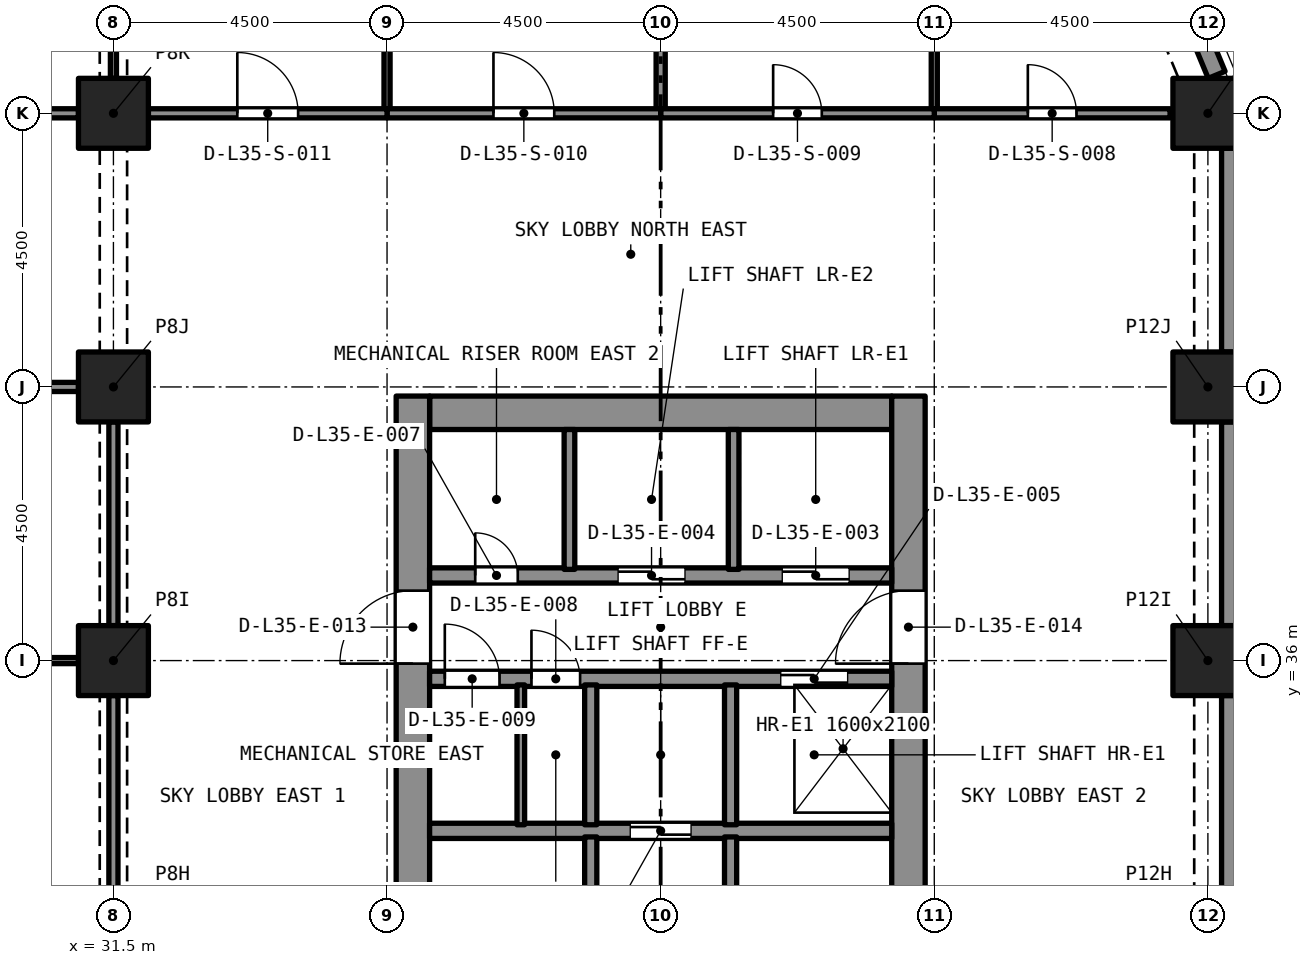
"""IFC4 building model, lengths in metres.
Left out: names, types, materials, properties, quantities, classifications, styles, units other than length and angle.
Written with IfcOpenShell. Run it as: python <this file> out.ifc"""

import sys

from ifc_helpers import new_model, si_unit, direction, frame, frame_2d, origin, origin_2d, place, context, subcontext, project, spatial, rectangle, extrude, element, fill, save


model = new_model("IFC4")
c1 = context("Model", 3, precision=1e-05, world=origin(), true_north=direction((0.0, 1.0)))
c2 = subcontext(c1, "Body", "Model", "MODEL_VIEW")
j1 = project(units=[si_unit("LENGTHUNIT", "METRE"), si_unit("PLANEANGLEUNIT", "RADIAN")], contexts=[c1])
p1 = place(None, origin())
s1 = spatial("IfcSite", under=j1, at=p1, CompositionType="ELEMENT")
p2 = place(p1, origin())
s2 = spatial("IfcBuilding", under=s1, at=p2, CompositionType="ELEMENT")
p3 = place(p2, frame((0.0, 0.0, 124.8)))
s3 = spatial("IfcBuildingStorey", under=s2, at=p3, CompositionType="ELEMENT", Elevation=124.8)
for number, where, z_axis, x_axis in (
    (1, (31.5, 36.0, 0.0), (0.0, 0.0, 1.0), (1.0, 0.0, 0.0)),
    (2, (49.5, 36.0, 0.0), (0.0, 0.0, 1.0), (1.0, 0.0, 0.0)),
    (3, (31.5, 40.5, 0.0), (0.0, 0.0, 1.0), (1.0, 0.0, 0.0)),
    (4, (49.5, 40.5, 0.0), (0.0, 0.0, 1.0), (1.0, 0.0, 0.0)),
    (5, (31.5, 45.0, 0.0), (0.0, 0.0, 1.0), (1.0, 0.0, 0.0)),
    (6, (49.5, 45.0, 0.0), (0.0, 0.0, 1.0), (1.0, 0.0, 0.0)),
):
    element("IfcColumn", number, at=place(p3, frame(where, z_axis=z_axis, x_axis=x_axis)), inside=s3, PredefinedType="COLUMN", context=c2, shape_type="SweptSolid", body=[
        extrude(rectangle(XDim=1.15, YDim=1.15, at=origin_2d()), origin(), (0.0, 0.0, 1.0), 5.4),
    ])
p4 = place(p3, frame((36.7, 40.075, 0.0), z_axis=(0.0, 0.0, 1.0), x_axis=(1.0, 0.0, 0.0)))
e7 = element("IfcWall", 7, at=p4, inside=s3, PredefinedType="SOLIDWALL", context=c2, shape_type="SweptSolid", body=[
    extrude(rectangle(XDim=7.6, YDim=0.55, at=frame_2d((3.8, 0.0))), origin(), (0.0, 0.0, 1.0), 5.4),
])
p5 = place(p3, frame((36.425, 27.15, 0.0), z_axis=(0.0, 0.0, 1.0), x_axis=(0.0, 1.0, 0.0)))
e8 = element("IfcWall", 8, at=p5, inside=s3, PredefinedType="SOLIDWALL", context=c2, shape_type="SweptSolid", body=[
    extrude(rectangle(XDim=13.2, YDim=0.55, at=frame_2d((6.6, 0.0))), origin(), (0.0, 0.0, 1.0), 5.4),
])
p6 = place(p5, frame((8.8, 0.0, 0.0)))
e9 = element("IfcOpeningElement", 9, at=p6, cuts=e8, PredefinedType="OPENING", context=c2, shape_type="SweptSolid", body=[
    extrude(rectangle(XDim=1.2, YDim=2.1, at=frame_2d((0.6, 1.05))), frame((0.0, 0.285, 0.0), z_axis=(0.0, -1.0, 0.0), x_axis=(1.0, 0.0, 0.0)), (0.0, 0.0, 1.0), 0.57),
])
p7 = place(p3, frame((44.575, 27.15, 0.0), z_axis=(0.0, 0.0, 1.0), x_axis=(0.0, 1.0, 0.0)))
e10 = element("IfcWall", 10, at=p7, inside=s3, PredefinedType="SOLIDWALL", context=c2, shape_type="SweptSolid", body=[
    extrude(rectangle(XDim=13.2, YDim=0.55, at=frame_2d((6.6, 0.0))), origin(), (0.0, 0.0, 1.0), 5.4),
])
p8 = place(p7, frame((8.8, 0.0, 0.0)))
e11 = element("IfcOpeningElement", 11, at=p8, cuts=e10, PredefinedType="OPENING", context=c2, shape_type="SweptSolid", body=[
    extrude(rectangle(XDim=1.2, YDim=2.1, at=frame_2d((0.6, 1.05))), frame((0.0, 0.285, 0.0), z_axis=(0.0, -1.0, 0.0), x_axis=(1.0, 0.0, 0.0)), (0.0, 0.0, 1.0), 0.57),
])
for number, where, z_axis, x_axis in (
    (12, (49.875, 35.425, 0.0), (0.0, 0.0, 1.0), (0.0, -1.0, 0.0)),
    (13, (49.875, 39.925, 0.0), (0.0, 0.0, 1.0), (0.0, -1.0, 0.0)),
    (14, (49.875, 44.425, 0.0), (0.0, 0.0, 1.0), (0.0, -1.0, 0.0)),
):
    element("IfcWall", number, at=place(p3, frame(where, z_axis=z_axis, x_axis=x_axis)), inside=s3, PredefinedType="SOLIDWALL", context=c2, shape_type="SweptSolid", body=[
        extrude(rectangle(XDim=3.35, YDim=0.3, at=frame_2d((1.675, 0.0))), origin(), (0.0, 0.0, 1.0), 5.4),
    ])
p9 = place(p3, frame((48.816, 47.631, 0.0), z_axis=(0.0, 0.0, 1.0), x_axis=(0.382723818695, -0.923862802911, 0.0)))
e15 = element("IfcWall", 15, at=p9, inside=s3, PredefinedType="SOLIDWALL", context=c2, shape_type="SweptSolid", body=[
    extrude(rectangle(XDim=2.164, YDim=0.3, at=frame_2d((1.082, 0.0))), origin(), (0.0, 0.0, 1.0), 5.4),
])
p10 = place(p3, frame((36.7, 33.2, 0.0), z_axis=(0.0, 0.0, 1.0), x_axis=(1.0, 0.0, 0.0)))
e16 = element("IfcWall", 16, at=p10, inside=s3, PredefinedType="SOLIDWALL", context=c2, shape_type="SweptSolid", body=[
    extrude(rectangle(XDim=7.6, YDim=0.25, at=frame_2d((3.8, 0.0))), origin(), (0.0, 0.0, 1.0), 5.1),
])
p11 = place(p10, frame((3.3, 0.0, 0.0)))
e17 = element("IfcOpeningElement", 17, at=p11, cuts=e16, PredefinedType="OPENING", context=c2, shape_type="SweptSolid", body=[
    extrude(rectangle(XDim=1.0, YDim=2.1, at=frame_2d((0.5, 1.05))), frame((0.0, 0.135, 0.0), z_axis=(0.0, -1.0, 0.0), x_axis=(1.0, 0.0, 0.0)), (0.0, 0.0, 1.0), 0.27),
])
p12 = place(p3, frame((36.7, 35.7, 0.0), z_axis=(0.0, 0.0, 1.0), x_axis=(1.0, 0.0, 0.0)))
e18 = element("IfcWall", 18, at=p12, inside=s3, PredefinedType="SOLIDWALL", context=c2, shape_type="SweptSolid", body=[
    extrude(rectangle(XDim=7.6, YDim=0.25, at=frame_2d((3.8, 0.0))), origin(), (0.0, 0.0, 1.0), 5.1),
])
p13 = place(p12, frame((5.775, 0.0, 0.0)))
e19 = element("IfcOpeningElement", 19, at=p13, cuts=e18, PredefinedType="OPENING", context=c2, shape_type="SweptSolid", body=[
    extrude(rectangle(XDim=1.1, YDim=2.4, at=frame_2d((0.55, 1.2))), frame((0.0, 0.135, 0.0), z_axis=(0.0, -1.0, 0.0), x_axis=(1.0, 0.0, 0.0)), (0.0, 0.0, 1.0), 0.27),
])
p14 = place(p12, frame((1.675, 0.0, 0.0)))
e20 = element("IfcOpeningElement", 20, at=p14, cuts=e18, PredefinedType="OPENING", context=c2, shape_type="SweptSolid", body=[
    extrude(rectangle(XDim=0.8, YDim=2.1, at=frame_2d((0.4, 1.05))), frame((0.0, 0.135, 0.0), z_axis=(0.0, -1.0, 0.0), x_axis=(1.0, 0.0, 0.0)), (0.0, 0.0, 1.0), 0.27),
])
p15 = place(p12, frame((0.25, 0.0, 0.0)))
e21 = element("IfcOpeningElement", 21, at=p15, cuts=e18, PredefinedType="OPENING", context=c2, shape_type="SweptSolid", body=[
    extrude(rectangle(XDim=0.9, YDim=2.1, at=frame_2d((0.45, 1.05))), frame((0.0, 0.135, 0.0), z_axis=(0.0, -1.0, 0.0), x_axis=(1.0, 0.0, 0.0)), (0.0, 0.0, 1.0), 0.27),
])
p16 = place(p3, frame((36.7, 37.4, 0.0), z_axis=(0.0, 0.0, 1.0), x_axis=(1.0, 0.0, 0.0)))
e22 = element("IfcWall", 22, at=p16, inside=s3, PredefinedType="SOLIDWALL", context=c2, shape_type="SweptSolid", body=[
    extrude(rectangle(XDim=7.6, YDim=0.25, at=frame_2d((3.8, 0.0))), origin(), (0.0, 0.0, 1.0), 5.1),
])
p17 = place(p16, frame((5.8, 0.0, 0.0)))
e23 = element("IfcOpeningElement", 23, at=p17, cuts=e22, PredefinedType="OPENING", context=c2, shape_type="SweptSolid", body=[
    extrude(rectangle(XDim=1.1, YDim=2.4, at=frame_2d((0.55, 1.2))), frame((0.0, 0.135, 0.0), z_axis=(0.0, -1.0, 0.0), x_axis=(1.0, 0.0, 0.0)), (0.0, 0.0, 1.0), 0.27),
])
p18 = place(p16, frame((3.1, 0.0, 0.0)))
e24 = element("IfcOpeningElement", 24, at=p18, cuts=e22, PredefinedType="OPENING", context=c2, shape_type="SweptSolid", body=[
    extrude(rectangle(XDim=1.1, YDim=2.4, at=frame_2d((0.55, 1.2))), frame((0.0, 0.135, 0.0), z_axis=(0.0, -1.0, 0.0), x_axis=(1.0, 0.0, 0.0)), (0.0, 0.0, 1.0), 0.27),
])
p19 = place(p16, frame((0.75, 0.0, 0.0)))
e25 = element("IfcOpeningElement", 25, at=p19, cuts=e22, PredefinedType="OPENING", context=c2, shape_type="SweptSolid", body=[
    extrude(rectangle(XDim=0.7, YDim=2.1, at=frame_2d((0.35, 1.05))), frame((0.0, 0.135, 0.0), z_axis=(0.0, -1.0, 0.0), x_axis=(1.0, 0.0, 0.0)), (0.0, 0.0, 1.0), 0.27),
])
p20 = place(p3, frame((41.65, 27.7, 0.0), z_axis=(0.0, 0.0, 1.0), x_axis=(0.0, 1.0, 0.0)))
e26 = element("IfcWall", 26, at=p20, inside=s3, PredefinedType="SOLIDWALL", context=c2, shape_type="SweptSolid", body=[
    extrude(rectangle(XDim=5.4, YDim=0.2, at=frame_2d((2.7, 0.0))), origin(), (0.0, 0.0, 1.0), 5.1),
])
p21 = place(p20, frame((0.2, 0.0, 0.0)))
e27 = element("IfcOpeningElement", 27, at=p21, cuts=e26, PredefinedType="OPENING", context=c2, shape_type="SweptSolid", body=[
    extrude(rectangle(XDim=0.9, YDim=2.1, at=frame_2d((0.45, 1.05))), frame((0.0, 0.11, 0.0), z_axis=(0.0, -1.0, 0.0), x_axis=(1.0, 0.0, 0.0)), (0.0, 0.0, 1.0), 0.22),
])
p22 = place(p3, frame((39.35, 27.7, 0.0), z_axis=(0.0, 0.0, 1.0), x_axis=(0.0, 1.0, 0.0)))
e28 = element("IfcWall", 28, at=p22, inside=s3, PredefinedType="SOLIDWALL", context=c2, shape_type="SweptSolid", body=[
    extrude(rectangle(XDim=5.4, YDim=0.2, at=frame_2d((2.7, 0.0))), origin(), (0.0, 0.0, 1.0), 5.1),
])
p23 = place(p22, frame((0.2, 0.0, 0.0)))
e29 = element("IfcOpeningElement", 29, at=p23, cuts=e28, PredefinedType="OPENING", context=c2, shape_type="SweptSolid", body=[
    extrude(rectangle(XDim=0.9, YDim=2.1, at=frame_2d((0.45, 1.05))), frame((0.0, 0.11, 0.0), z_axis=(0.0, -1.0, 0.0), x_axis=(1.0, 0.0, 0.0)), (0.0, 0.0, 1.0), 0.22),
])
for number, where, z_axis, x_axis in (
    (30, (41.65, 33.3, 0.0), (0.0, 0.0, 1.0), (0.0, 1.0, 0.0)),
    (31, (39.35, 33.3, 0.0), (0.0, 0.0, 1.0), (0.0, 1.0, 0.0)),
):
    element("IfcWall", number, at=place(p3, frame(where, z_axis=z_axis, x_axis=x_axis)), inside=s3, PredefinedType="SOLIDWALL", context=c2, shape_type="SweptSolid", body=[
        extrude(rectangle(XDim=2.3, YDim=0.2, at=frame_2d((1.15, 0.0))), origin(), (0.0, 0.0, 1.0), 5.1),
    ])
for number, where, z_axis, x_axis in (
    (32, (41.7, 37.5, 0.0), (0.0, 0.0, 1.0), (0.0, 1.0, 0.0)),
    (33, (39.0, 37.5, 0.0), (0.0, 0.0, 1.0), (0.0, 1.0, 0.0)),
):
    element("IfcWall", number, at=place(p3, frame(where, z_axis=z_axis, x_axis=x_axis)), inside=s3, PredefinedType="SOLIDWALL", context=c2, shape_type="SweptSolid", body=[
        extrude(rectangle(XDim=2.3, YDim=0.175, at=frame_2d((1.15, 0.0))), origin(), (0.0, 0.0, 1.0), 5.1),
    ])
p24 = place(p3, frame((38.2, 33.3, 0.0), z_axis=(0.0, 0.0, 1.0), x_axis=(0.0, 1.0, 0.0)))
e34 = element("IfcWall", 34, at=p24, inside=s3, PredefinedType="PARTITIONING", context=c2, shape_type="SweptSolid", body=[
    extrude(rectangle(XDim=2.3, YDim=0.125, at=frame_2d((1.15, 0.0))), origin(), (0.0, 0.0, 1.0), 5.1),
])
p25 = place(p3, frame((18.575, 36.0, 0.0), z_axis=(0.0, 0.0, 1.0), x_axis=(1.0, 0.0, 0.0)))
e35 = element("IfcWall", 35, at=p25, inside=s3, PredefinedType="PARTITIONING", context=c2, shape_type="SweptSolid", body=[
    extrude(rectangle(XDim=12.35, YDim=0.1, at=frame_2d((6.175, 0.0))), origin(), (0.0, 0.0, 1.0), 4.95),
])
p26 = place(p3, frame((31.5, 32.075, 0.0), z_axis=(0.0, 0.0, 1.0), x_axis=(0.0, 1.0, 0.0)))
e36 = element("IfcWall", 36, at=p26, inside=s3, PredefinedType="PARTITIONING", context=c2, shape_type="SweptSolid", body=[
    extrude(rectangle(XDim=3.35, YDim=0.15, at=frame_2d((1.675, 0.0))), origin(), (0.0, 0.0, 1.0), 4.58),
])
p27 = place(p3, frame((30.925, 40.5, 0.0), z_axis=(0.0, 0.0, 1.0), x_axis=(-1.0, 0.0, 0.0)))
e37 = element("IfcWall", 37, at=p27, inside=s3, PredefinedType="PARTITIONING", context=c2, shape_type="SweptSolid", body=[
    extrude(rectangle(XDim=12.35, YDim=0.15, at=frame_2d((6.175, 0.0))), origin(), (0.0, 0.0, 1.0), 4.95),
])
p28 = place(p27, frame((5.425, 0.0, 0.0)))
e38 = element("IfcOpeningElement", 38, at=p28, cuts=e37, PredefinedType="OPENING", context=c2, shape_type="SweptSolid", body=[
    extrude(rectangle(XDim=1.5, YDim=2.4, at=frame_2d((0.75, 1.2))), frame((0.0, 0.085, 0.0), z_axis=(0.0, -1.0, 0.0), x_axis=(1.0, 0.0, 0.0)), (0.0, 0.0, 1.0), 0.17),
])
p29 = place(p3, frame((31.5, 36.575, 0.0), z_axis=(0.0, 0.0, 1.0), x_axis=(0.0, 1.0, 0.0)))
e39 = element("IfcWall", 39, at=p29, inside=s3, PredefinedType="PARTITIONING", context=c2, shape_type="SweptSolid", body=[
    extrude(rectangle(XDim=3.35, YDim=0.15, at=frame_2d((1.675, 0.0))), origin(), (0.0, 0.0, 1.0), 4.58),
])
p30 = place(p3, frame((27.0, 45.0, 0.0), z_axis=(0.0, 0.0, 1.0), x_axis=(1.0, 0.0, 0.0)))
e40 = element("IfcWall", 40, at=p30, inside=s3, PredefinedType="PARTITIONING", context=c2, shape_type="SweptSolid", body=[
    extrude(rectangle(XDim=3.925, YDim=0.15, at=frame_2d((1.962, 0.0))), origin(), (0.0, 0.0, 1.0), 4.95),
])
p31 = place(p30, frame((1.212, 0.0, 0.0)))
e41 = element("IfcOpeningElement", 41, at=p31, cuts=e40, PredefinedType="OPENING", context=c2, shape_type="SweptSolid", body=[
    extrude(rectangle(XDim=1.5, YDim=2.4, at=frame_2d((0.75, 1.2))), frame((0.0, 0.085, 0.0), z_axis=(0.0, -1.0, 0.0), x_axis=(1.0, 0.0, 0.0)), (0.0, 0.0, 1.0), 0.17),
])
p32 = place(p3, frame((31.5, 45.575, 0.0), z_axis=(0.0, 0.0, 1.0), x_axis=(0.0, 1.0, 0.0)))
e42 = element("IfcWall", 42, at=p32, inside=s3, PredefinedType="PARTITIONING", context=c2, shape_type="SweptSolid", body=[
    extrude(rectangle(XDim=3.35, YDim=0.1, at=frame_2d((1.675, 0.0))), origin(), (0.0, 0.0, 1.0), 4.58),
])
p33 = place(p3, frame((45.0, 45.075, 0.0), z_axis=(0.0, 0.0, 1.0), x_axis=(0.0, 1.0, 0.0)))
e43 = element("IfcWall", 43, at=p33, inside=s3, PredefinedType="PARTITIONING", context=c2, shape_type="SweptSolid", body=[
    extrude(rectangle(XDim=3.803, YDim=0.1, at=frame_2d((1.901, 0.0))), origin(), (0.0, 0.0, 1.0), 5.1),
])
p34 = place(p3, frame((45.0, 45.0, 0.0), z_axis=(0.0, 0.0, 1.0), x_axis=(1.0, 0.0, 0.0)))
e44 = element("IfcWall", 44, at=p34, inside=s3, PredefinedType="PARTITIONING", context=c2, shape_type="SweptSolid", body=[
    extrude(rectangle(XDim=3.878, YDim=0.15, at=frame_2d((1.939, 0.0))), origin(), (0.0, 0.0, 1.0), 5.1),
])
p35 = place(p34, frame((1.539, 0.0, 0.0)))
e45 = element("IfcOpeningElement", 45, at=p35, cuts=e44, PredefinedType="OPENING", context=c2, shape_type="SweptSolid", body=[
    extrude(rectangle(XDim=0.8, YDim=2.1, at=frame_2d((0.4, 1.05))), frame((0.0, 0.085, 0.0), z_axis=(0.0, -1.0, 0.0), x_axis=(1.0, 0.0, 0.0)), (0.0, 0.0, 1.0), 0.17),
])
p36 = place(p3, frame((40.5, 45.075, 0.0), z_axis=(0.0, 0.0, 1.0), x_axis=(0.0, 1.0, 0.0)))
e46 = element("IfcWall", 46, at=p36, inside=s3, PredefinedType="PARTITIONING", context=c2, shape_type="SweptSolid", body=[
    extrude(rectangle(XDim=3.85, YDim=0.15, at=frame_2d((1.925, 0.0))), origin(), (0.0, 0.0, 1.0), 5.1),
])
p37 = place(p3, frame((40.5, 45.0, 0.0), z_axis=(0.0, 0.0, 1.0), x_axis=(1.0, 0.0, 0.0)))
e47 = element("IfcWall", 47, at=p37, inside=s3, PredefinedType="PARTITIONING", context=c2, shape_type="SweptSolid", body=[
    extrude(rectangle(XDim=4.5, YDim=0.15, at=frame_2d((2.25, 0.0))), origin(), (0.0, 0.0, 1.0), 5.1),
])
p38 = place(p37, frame((1.85, 0.0, 0.0)))
e48 = element("IfcOpeningElement", 48, at=p38, cuts=e47, PredefinedType="OPENING", context=c2, shape_type="SweptSolid", body=[
    extrude(rectangle(XDim=0.8, YDim=2.1, at=frame_2d((0.4, 1.05))), frame((0.0, 0.085, 0.0), z_axis=(0.0, -1.0, 0.0), x_axis=(1.0, 0.0, 0.0)), (0.0, 0.0, 1.0), 0.17),
])
p39 = place(p3, frame((36.0, 45.075, 0.0), z_axis=(0.0, 0.0, 1.0), x_axis=(0.0, 1.0, 0.0)))
e49 = element("IfcWall", 49, at=p39, inside=s3, PredefinedType="PARTITIONING", context=c2, shape_type="SweptSolid", body=[
    extrude(rectangle(XDim=3.85, YDim=0.1, at=frame_2d((1.925, 0.0))), origin(), (0.0, 0.0, 1.0), 5.1),
])
p40 = place(p3, frame((36.0, 45.0, 0.0), z_axis=(0.0, 0.0, 1.0), x_axis=(1.0, 0.0, 0.0)))
e50 = element("IfcWall", 50, at=p40, inside=s3, PredefinedType="PARTITIONING", context=c2, shape_type="SweptSolid", body=[
    extrude(rectangle(XDim=4.5, YDim=0.15, at=frame_2d((2.25, 0.0))), origin(), (0.0, 0.0, 1.0), 5.1),
])
p41 = place(p40, frame((1.75, 0.0, 0.0)))
e51 = element("IfcOpeningElement", 51, at=p41, cuts=e50, PredefinedType="OPENING", context=c2, shape_type="SweptSolid", body=[
    extrude(rectangle(XDim=1.0, YDim=2.1, at=frame_2d((0.5, 1.05))), frame((0.0, 0.085, 0.0), z_axis=(0.0, -1.0, 0.0), x_axis=(1.0, 0.0, 0.0)), (0.0, 0.0, 1.0), 0.17),
])
p42 = place(p3, frame((32.075, 45.0, 0.0), z_axis=(0.0, 0.0, 1.0), x_axis=(1.0, 0.0, 0.0)))
e52 = element("IfcWall", 52, at=p42, inside=s3, PredefinedType="PARTITIONING", context=c2, shape_type="SweptSolid", body=[
    extrude(rectangle(XDim=3.925, YDim=0.15, at=frame_2d((1.962, 0.0))), origin(), (0.0, 0.0, 1.0), 5.1),
])
p43 = place(p42, frame((1.462, 0.0, 0.0)))
e53 = element("IfcOpeningElement", 53, at=p43, cuts=e52, PredefinedType="OPENING", context=c2, shape_type="SweptSolid", body=[
    extrude(rectangle(XDim=1.0, YDim=2.1, at=frame_2d((0.5, 1.05))), frame((0.0, 0.085, 0.0), z_axis=(0.0, -1.0, 0.0), x_axis=(1.0, 0.0, 0.0)), (0.0, 0.0, 1.0), 0.17),
])
p44 = place(p17, origin())
e54 = element("IfcDoor", 54, at=p44, inside=s3, OperationType="SLIDING_TO_LEFT", PredefinedType="DOOR", context=c2, shape_type="SweptSolid", body=[
    extrude(rectangle(XDim=1.1, YDim=2.4, at=frame_2d((0.55, 1.2))), frame((0.0, 0.025, 0.0), z_axis=(0.0, -1.0, 0.0), x_axis=(1.0, 0.0, 0.0)), (0.0, 0.0, 1.0), 0.05),
])
fill(e23, e54)
p45 = place(p18, origin())
e55 = element("IfcDoor", 55, at=p45, inside=s3, OperationType="SLIDING_TO_LEFT", PredefinedType="DOOR", context=c2, shape_type="SweptSolid", body=[
    extrude(rectangle(XDim=1.1, YDim=2.4, at=frame_2d((0.55, 1.2))), frame((0.0, 0.025, 0.0), z_axis=(0.0, -1.0, 0.0), x_axis=(1.0, 0.0, 0.0)), (0.0, 0.0, 1.0), 0.05),
])
fill(e24, e55)
p46 = place(p13, origin())
e56 = element("IfcDoor", 56, at=p46, inside=s3, OperationType="SLIDING_TO_LEFT", PredefinedType="DOOR", context=c2, shape_type="SweptSolid", body=[
    extrude(rectangle(XDim=1.1, YDim=2.4, at=frame_2d((0.55, 1.2))), frame((0.0, 0.025, 0.0), z_axis=(0.0, -1.0, 0.0), x_axis=(1.0, 0.0, 0.0)), (0.0, 0.0, 1.0), 0.05),
])
fill(e19, e56)
p47 = place(p11, origin())
e57 = element("IfcDoor", 57, at=p47, inside=s3, OperationType="SLIDING_TO_LEFT", PredefinedType="DOOR", context=c2, shape_type="SweptSolid", body=[
    extrude(rectangle(XDim=1.0, YDim=2.1, at=frame_2d((0.5, 1.05))), frame((0.0, 0.025, 0.0), z_axis=(0.0, -1.0, 0.0), x_axis=(1.0, 0.0, 0.0)), (0.0, 0.0, 1.0), 0.05),
])
fill(e17, e57)
p48 = place(p19, origin())
e58 = element("IfcDoor", 58, at=p48, inside=s3, OperationType="SINGLE_SWING_LEFT", PredefinedType="DOOR", context=c2, shape_type="SweptSolid", body=[
    extrude(rectangle(XDim=0.7, YDim=2.1, at=frame_2d((0.35, 1.05))), frame((0.0, 0.025, 0.0), z_axis=(0.0, -1.0, 0.0), x_axis=(1.0, 0.0, 0.0)), (0.0, 0.0, 1.0), 0.05),
])
fill(e25, e58)
p49 = place(p14, origin())
e59 = element("IfcDoor", 59, at=p49, inside=s3, OperationType="SINGLE_SWING_LEFT", PredefinedType="DOOR", context=c2, shape_type="SweptSolid", body=[
    extrude(rectangle(XDim=0.8, YDim=2.1, at=frame_2d((0.4, 1.05))), frame((0.0, 0.025, 0.0), z_axis=(0.0, -1.0, 0.0), x_axis=(1.0, 0.0, 0.0)), (0.0, 0.0, 1.0), 0.05),
])
fill(e20, e59)
p50 = place(p15, origin())
e60 = element("IfcDoor", 60, at=p50, inside=s3, OperationType="SINGLE_SWING_LEFT", PredefinedType="DOOR", context=c2, shape_type="SweptSolid", body=[
    extrude(rectangle(XDim=0.9, YDim=2.1, at=frame_2d((0.45, 1.05))), frame((0.0, 0.025, 0.0), z_axis=(0.0, -1.0, 0.0), x_axis=(1.0, 0.0, 0.0)), (0.0, 0.0, 1.0), 0.05),
])
fill(e21, e60)
p51 = place(p6, origin())
e61 = element("IfcDoor", 61, at=p51, inside=s3, OperationType="SINGLE_SWING_LEFT", PredefinedType="DOOR", context=c2, shape_type="SweptSolid", body=[
    extrude(rectangle(XDim=1.2, YDim=2.1, at=frame_2d((0.6, 1.05))), frame((0.0, 0.025, 0.0), z_axis=(0.0, -1.0, 0.0), x_axis=(1.0, 0.0, 0.0)), (0.0, 0.0, 1.0), 0.05),
])
fill(e9, e61)
p52 = place(p8, origin())
e62 = element("IfcDoor", 62, at=p52, inside=s3, OperationType="SINGLE_SWING_LEFT", PredefinedType="DOOR", context=c2, shape_type="SweptSolid", body=[
    extrude(rectangle(XDim=1.2, YDim=2.1, at=frame_2d((0.6, 1.05))), frame((0.0, 0.025, 0.0), z_axis=(0.0, -1.0, 0.0), x_axis=(1.0, 0.0, 0.0)), (0.0, 0.0, 1.0), 0.05),
])
fill(e11, e62)
p53 = place(p35, origin())
e63 = element("IfcDoor", 63, at=p53, inside=s3, OperationType="SINGLE_SWING_RIGHT", PredefinedType="DOOR", context=c2, shape_type="SweptSolid", body=[
    extrude(rectangle(XDim=0.8, YDim=2.1, at=frame_2d((0.4, 1.05))), frame((0.0, 0.025, 0.0), z_axis=(0.0, -1.0, 0.0), x_axis=(1.0, 0.0, 0.0)), (0.0, 0.0, 1.0), 0.05),
])
fill(e45, e63)
p54 = place(p38, origin())
e64 = element("IfcDoor", 64, at=p54, inside=s3, OperationType="SINGLE_SWING_RIGHT", PredefinedType="DOOR", context=c2, shape_type="SweptSolid", body=[
    extrude(rectangle(XDim=0.8, YDim=2.1, at=frame_2d((0.4, 1.05))), frame((0.0, 0.025, 0.0), z_axis=(0.0, -1.0, 0.0), x_axis=(1.0, 0.0, 0.0)), (0.0, 0.0, 1.0), 0.05),
])
fill(e48, e64)
p55 = place(p41, origin())
e65 = element("IfcDoor", 65, at=p55, inside=s3, OperationType="SINGLE_SWING_RIGHT", PredefinedType="DOOR", context=c2, shape_type="SweptSolid", body=[
    extrude(rectangle(XDim=1.0, YDim=2.1, at=frame_2d((0.5, 1.05))), frame((0.0, 0.025, 0.0), z_axis=(0.0, -1.0, 0.0), x_axis=(1.0, 0.0, 0.0)), (0.0, 0.0, 1.0), 0.05),
])
fill(e51, e65)
p56 = place(p43, origin())
e66 = element("IfcDoor", 66, at=p56, inside=s3, OperationType="SINGLE_SWING_RIGHT", PredefinedType="DOOR", context=c2, shape_type="SweptSolid", body=[
    extrude(rectangle(XDim=1.0, YDim=2.1, at=frame_2d((0.5, 1.05))), frame((0.0, 0.025, 0.0), z_axis=(0.0, -1.0, 0.0), x_axis=(1.0, 0.0, 0.0)), (0.0, 0.0, 1.0), 0.05),
])
fill(e53, e66)
save(model, sys.argv[1])
